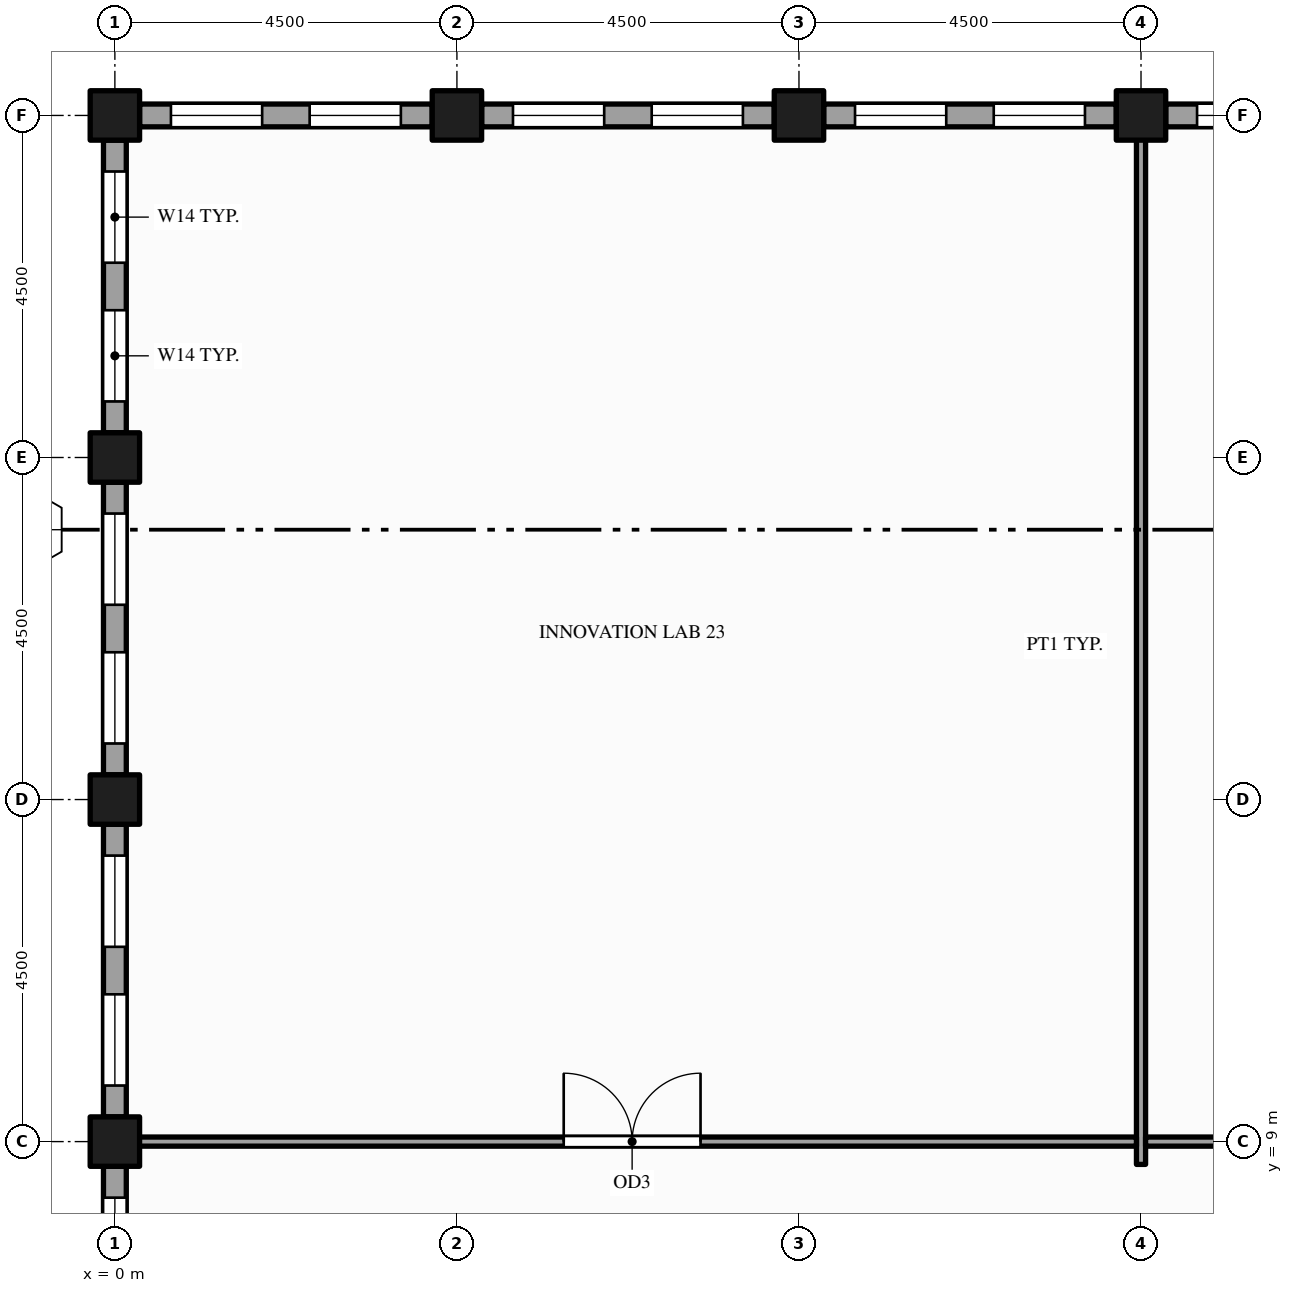
"""IFC4 building model, lengths in metres.
Left out: names, types, materials, properties, quantities, classifications, styles, units other than length and angle.
Written with IfcOpenShell. Run it as: python <this file> out.ifc"""

import sys

from ifc_helpers import new_model, si_unit, direction, frame, frame_2d, origin, origin_2d, place, context, subcontext, project, spatial, rectangle, hollow_rectangle, extrude, element, fill, save


model = new_model("IFC4")
c1 = context("Model", 3, precision=1e-05, world=origin(), true_north=direction((0.0, 1.0)))
c2 = subcontext(c1, "Body", "Model", "MODEL_VIEW")
j1 = project(units=[si_unit("LENGTHUNIT", "METRE"), si_unit("PLANEANGLEUNIT", "RADIAN")], contexts=[c1])
p1 = place(None, origin())
s1 = spatial("IfcSite", under=j1, at=p1, CompositionType="ELEMENT")
p2 = place(p1, origin())
s2 = spatial("IfcBuilding", under=s1, at=p2, CompositionType="ELEMENT")
p3 = place(p2, frame((0.0, 0.0, 269.0)))
s3 = spatial("IfcBuildingStorey", under=s2, at=p3, CompositionType="ELEMENT", Elevation=269.0)
for number, where, z_axis, x_axis in (
    (1, (0.0, 9.0, -0.15), (0.0, 0.0, 1.0), (1.0, 0.0, 0.0)),
    (2, (0.0, 13.5, -0.15), (0.0, 0.0, 1.0), (1.0, 0.0, 0.0)),
    (3, (0.0, 18.0, -0.15), (0.0, 0.0, 1.0), (1.0, 0.0, 0.0)),
    (4, (0.0, 22.5, -0.15), (0.0, 0.0, 1.0), (1.0, 0.0, 0.0)),
    (5, (4.5, 22.5, -0.15), (0.0, 0.0, 1.0), (1.0, 0.0, 0.0)),
    (6, (9.0, 22.5, -0.15), (0.0, 0.0, 1.0), (1.0, 0.0, 0.0)),
    (7, (13.5, 22.5, -0.15), (0.0, 0.0, 1.0), (1.0, 0.0, 0.0)),
):
    element("IfcColumn", number, at=place(p3, frame(where, z_axis=z_axis, x_axis=x_axis)), inside=s3, PredefinedType="COLUMN", context=c2, shape_type="SweptSolid", body=[
        extrude(hollow_rectangle(XDim=0.65, YDim=0.65, WallThickness=0.032, at=origin_2d()), origin(), (0.0, 0.0, 1.0), 4.0),
    ])
p4 = place(p3, frame((17.675, 22.5, 0.0), z_axis=(0.0, 0.0, 1.0), x_axis=(-1.0, 0.0, 0.0)))
e8 = element("IfcWall", 8, at=p4, inside=s3, PredefinedType="STANDARD", context=c2, shape_type="SweptSolid", body=[
    extrude(rectangle(XDim=3.85, YDim=0.3, at=frame_2d((1.925, 0.0))), origin(), (0.0, 0.0, 1.0), 2.87),
])
p5 = place(p4, frame((0.413, 0.0, 0.9)))
e9 = element("IfcOpeningElement", 9, at=p5, cuts=e8, PredefinedType="OPENING", context=c2, shape_type="SweptSolid", body=[
    extrude(rectangle(XDim=1.2, YDim=1.75, at=frame_2d((0.6, 0.875))), frame((0.0, 0.16, 0.0), z_axis=(0.0, -1.0, 0.0), x_axis=(1.0, 0.0, 0.0)), (0.0, 0.0, 1.0), 0.32),
])
p6 = place(p4, frame((2.238, 0.0, 0.9)))
e10 = element("IfcOpeningElement", 10, at=p6, cuts=e8, PredefinedType="OPENING", context=c2, shape_type="SweptSolid", body=[
    extrude(rectangle(XDim=1.2, YDim=1.75, at=frame_2d((0.6, 0.875))), frame((0.0, 0.16, 0.0), z_axis=(0.0, -1.0, 0.0), x_axis=(1.0, 0.0, 0.0)), (0.0, 0.0, 1.0), 0.32),
])
p7 = place(p3, frame((13.175, 22.5, 0.0), z_axis=(0.0, 0.0, 1.0), x_axis=(-1.0, 0.0, 0.0)))
e11 = element("IfcWall", 11, at=p7, inside=s3, PredefinedType="STANDARD", context=c2, shape_type="SweptSolid", body=[
    extrude(rectangle(XDim=3.85, YDim=0.3, at=frame_2d((1.925, 0.0))), origin(), (0.0, 0.0, 1.0), 2.87),
])
p8 = place(p7, frame((0.413, 0.0, 0.9)))
e12 = element("IfcOpeningElement", 12, at=p8, cuts=e11, PredefinedType="OPENING", context=c2, shape_type="SweptSolid", body=[
    extrude(rectangle(XDim=1.2, YDim=1.75, at=frame_2d((0.6, 0.875))), frame((0.0, 0.16, 0.0), z_axis=(0.0, -1.0, 0.0), x_axis=(1.0, 0.0, 0.0)), (0.0, 0.0, 1.0), 0.32),
])
p9 = place(p7, frame((2.238, 0.0, 0.9)))
e13 = element("IfcOpeningElement", 13, at=p9, cuts=e11, PredefinedType="OPENING", context=c2, shape_type="SweptSolid", body=[
    extrude(rectangle(XDim=1.2, YDim=1.75, at=frame_2d((0.6, 0.875))), frame((0.0, 0.16, 0.0), z_axis=(0.0, -1.0, 0.0), x_axis=(1.0, 0.0, 0.0)), (0.0, 0.0, 1.0), 0.32),
])
p10 = place(p3, frame((8.675, 22.5, 0.0), z_axis=(0.0, 0.0, 1.0), x_axis=(-1.0, 0.0, 0.0)))
e14 = element("IfcWall", 14, at=p10, inside=s3, PredefinedType="STANDARD", context=c2, shape_type="SweptSolid", body=[
    extrude(rectangle(XDim=3.85, YDim=0.3, at=frame_2d((1.925, 0.0))), origin(), (0.0, 0.0, 1.0), 2.87),
])
p11 = place(p10, frame((0.413, 0.0, 0.9)))
e15 = element("IfcOpeningElement", 15, at=p11, cuts=e14, PredefinedType="OPENING", context=c2, shape_type="SweptSolid", body=[
    extrude(rectangle(XDim=1.2, YDim=1.75, at=frame_2d((0.6, 0.875))), frame((0.0, 0.16, 0.0), z_axis=(0.0, -1.0, 0.0), x_axis=(1.0, 0.0, 0.0)), (0.0, 0.0, 1.0), 0.32),
])
p12 = place(p10, frame((2.238, 0.0, 0.9)))
e16 = element("IfcOpeningElement", 16, at=p12, cuts=e14, PredefinedType="OPENING", context=c2, shape_type="SweptSolid", body=[
    extrude(rectangle(XDim=1.2, YDim=1.75, at=frame_2d((0.6, 0.875))), frame((0.0, 0.16, 0.0), z_axis=(0.0, -1.0, 0.0), x_axis=(1.0, 0.0, 0.0)), (0.0, 0.0, 1.0), 0.32),
])
p13 = place(p3, frame((4.175, 22.5, 0.0), z_axis=(0.0, 0.0, 1.0), x_axis=(-1.0, 0.0, 0.0)))
e17 = element("IfcWall", 17, at=p13, inside=s3, PredefinedType="STANDARD", context=c2, shape_type="SweptSolid", body=[
    extrude(rectangle(XDim=3.85, YDim=0.3, at=frame_2d((1.925, 0.0))), origin(), (0.0, 0.0, 1.0), 2.87),
])
p14 = place(p13, frame((0.413, 0.0, 0.9)))
e18 = element("IfcOpeningElement", 18, at=p14, cuts=e17, PredefinedType="OPENING", context=c2, shape_type="SweptSolid", body=[
    extrude(rectangle(XDim=1.2, YDim=1.75, at=frame_2d((0.6, 0.875))), frame((0.0, 0.16, 0.0), z_axis=(0.0, -1.0, 0.0), x_axis=(1.0, 0.0, 0.0)), (0.0, 0.0, 1.0), 0.32),
])
p15 = place(p13, frame((2.238, 0.0, 0.9)))
e19 = element("IfcOpeningElement", 19, at=p15, cuts=e17, PredefinedType="OPENING", context=c2, shape_type="SweptSolid", body=[
    extrude(rectangle(XDim=1.2, YDim=1.75, at=frame_2d((0.6, 0.875))), frame((0.0, 0.16, 0.0), z_axis=(0.0, -1.0, 0.0), x_axis=(1.0, 0.0, 0.0)), (0.0, 0.0, 1.0), 0.32),
])
p16 = place(p3, frame((0.0, 22.175, 0.0), z_axis=(0.0, 0.0, 1.0), x_axis=(0.0, -1.0, 0.0)))
e20 = element("IfcWall", 20, at=p16, inside=s3, PredefinedType="STANDARD", context=c2, shape_type="SweptSolid", body=[
    extrude(rectangle(XDim=3.85, YDim=0.3, at=frame_2d((1.925, 0.0))), origin(), (0.0, 0.0, 1.0), 3.162),
])
p17 = place(p16, frame((0.413, 0.0, 0.9)))
e21 = element("IfcOpeningElement", 21, at=p17, cuts=e20, PredefinedType="OPENING", context=c2, shape_type="SweptSolid", body=[
    extrude(rectangle(XDim=1.2, YDim=2.0, at=frame_2d((0.6, 1.0))), frame((0.0, 0.16, 0.0), z_axis=(0.0, -1.0, 0.0), x_axis=(1.0, 0.0, 0.0)), (0.0, 0.0, 1.0), 0.32),
])
p18 = place(p16, frame((2.238, 0.0, 0.9)))
e22 = element("IfcOpeningElement", 22, at=p18, cuts=e20, PredefinedType="OPENING", context=c2, shape_type="SweptSolid", body=[
    extrude(rectangle(XDim=1.2, YDim=2.0, at=frame_2d((0.6, 1.0))), frame((0.0, 0.16, 0.0), z_axis=(0.0, -1.0, 0.0), x_axis=(1.0, 0.0, 0.0)), (0.0, 0.0, 1.0), 0.32),
])
p19 = place(p3, frame((0.0, 17.675, 0.0), z_axis=(0.0, 0.0, 1.0), x_axis=(0.0, -1.0, 0.0)))
e23 = element("IfcWall", 23, at=p19, inside=s3, PredefinedType="STANDARD", context=c2, shape_type="SweptSolid", body=[
    extrude(rectangle(XDim=3.85, YDim=0.3, at=frame_2d((1.925, 0.0))), origin(), (0.0, 0.0, 1.0), 3.162),
])
p20 = place(p19, frame((0.413, 0.0, 0.9)))
e24 = element("IfcOpeningElement", 24, at=p20, cuts=e23, PredefinedType="OPENING", context=c2, shape_type="SweptSolid", body=[
    extrude(rectangle(XDim=1.2, YDim=2.0, at=frame_2d((0.6, 1.0))), frame((0.0, 0.16, 0.0), z_axis=(0.0, -1.0, 0.0), x_axis=(1.0, 0.0, 0.0)), (0.0, 0.0, 1.0), 0.32),
])
p21 = place(p19, frame((2.238, 0.0, 0.9)))
e25 = element("IfcOpeningElement", 25, at=p21, cuts=e23, PredefinedType="OPENING", context=c2, shape_type="SweptSolid", body=[
    extrude(rectangle(XDim=1.2, YDim=2.0, at=frame_2d((0.6, 1.0))), frame((0.0, 0.16, 0.0), z_axis=(0.0, -1.0, 0.0), x_axis=(1.0, 0.0, 0.0)), (0.0, 0.0, 1.0), 0.32),
])
p22 = place(p3, frame((0.0, 13.175, 0.0), z_axis=(0.0, 0.0, 1.0), x_axis=(0.0, -1.0, 0.0)))
e26 = element("IfcWall", 26, at=p22, inside=s3, PredefinedType="STANDARD", context=c2, shape_type="SweptSolid", body=[
    extrude(rectangle(XDim=3.85, YDim=0.3, at=frame_2d((1.925, 0.0))), origin(), (0.0, 0.0, 1.0), 3.162),
])
p23 = place(p22, frame((0.413, 0.0, 0.9)))
e27 = element("IfcOpeningElement", 27, at=p23, cuts=e26, PredefinedType="OPENING", context=c2, shape_type="SweptSolid", body=[
    extrude(rectangle(XDim=1.2, YDim=2.0, at=frame_2d((0.6, 1.0))), frame((0.0, 0.16, 0.0), z_axis=(0.0, -1.0, 0.0), x_axis=(1.0, 0.0, 0.0)), (0.0, 0.0, 1.0), 0.32),
])
p24 = place(p22, frame((2.238, 0.0, 0.9)))
e28 = element("IfcOpeningElement", 28, at=p24, cuts=e26, PredefinedType="OPENING", context=c2, shape_type="SweptSolid", body=[
    extrude(rectangle(XDim=1.2, YDim=2.0, at=frame_2d((0.6, 1.0))), frame((0.0, 0.16, 0.0), z_axis=(0.0, -1.0, 0.0), x_axis=(1.0, 0.0, 0.0)), (0.0, 0.0, 1.0), 0.32),
])
p25 = place(p3, frame((0.0, 8.675, 0.0), z_axis=(0.0, 0.0, 1.0), x_axis=(0.0, -1.0, 0.0)))
e29 = element("IfcWall", 29, at=p25, inside=s3, PredefinedType="STANDARD", context=c2, shape_type="SweptSolid", body=[
    extrude(rectangle(XDim=3.85, YDim=0.3, at=frame_2d((1.925, 0.0))), origin(), (0.0, 0.0, 1.0), 3.162),
])
p26 = place(p25, frame((0.413, 0.0, 0.9)))
e30 = element("IfcOpeningElement", 30, at=p26, cuts=e29, PredefinedType="OPENING", context=c2, shape_type="SweptSolid", body=[
    extrude(rectangle(XDim=1.2, YDim=2.0, at=frame_2d((0.6, 1.0))), frame((0.0, 0.16, 0.0), z_axis=(0.0, -1.0, 0.0), x_axis=(1.0, 0.0, 0.0)), (0.0, 0.0, 1.0), 0.32),
])
p27 = place(p25, frame((2.238, 0.0, 0.9)))
e31 = element("IfcOpeningElement", 31, at=p27, cuts=e29, PredefinedType="OPENING", context=c2, shape_type="SweptSolid", body=[
    extrude(rectangle(XDim=1.2, YDim=2.0, at=frame_2d((0.6, 1.0))), frame((0.0, 0.16, 0.0), z_axis=(0.0, -1.0, 0.0), x_axis=(1.0, 0.0, 0.0)), (0.0, 0.0, 1.0), 0.32),
])
p28 = place(p3, frame((13.5, 8.7, 0.0), z_axis=(0.0, 0.0, 1.0), x_axis=(0.0, 1.0, 0.0)))
e32 = element("IfcWall", 32, at=p28, inside=s3, PredefinedType="PARTITIONING", context=c2, shape_type="SweptSolid", body=[
    extrude(rectangle(XDim=13.65, YDim=0.12, at=frame_2d((6.825, 0.0))), origin(), (0.0, 0.0, 1.0), 2.87),
])
p29 = place(p3, frame((0.15, 9.0, 0.0), z_axis=(0.0, 0.0, 1.0), x_axis=(1.0, 0.0, 0.0)))
e33 = element("IfcWall", 33, at=p29, inside=s3, PredefinedType="PARTITIONING", context=c2, shape_type="SweptSolid", body=[
    extrude(rectangle(XDim=13.29, YDim=0.12, at=frame_2d((6.645, 0.0))), origin(), (0.0, 0.0, 1.0), 2.87),
])
p30 = place(p29, frame((5.755, 0.0, 0.0)))
e34 = element("IfcOpeningElement", 34, at=p30, cuts=e33, PredefinedType="OPENING", context=c2, shape_type="SweptSolid", body=[
    extrude(rectangle(XDim=1.8, YDim=2.1, at=frame_2d((0.9, 1.05))), frame((0.0, 0.07, 0.0), z_axis=(0.0, -1.0, 0.0), x_axis=(1.0, 0.0, 0.0)), (0.0, 0.0, 1.0), 0.14),
])
p31 = place(p3, frame((13.56, 9.0, 0.0), z_axis=(0.0, 0.0, 1.0), x_axis=(1.0, 0.0, 0.0)))
e35 = element("IfcWall", 35, at=p31, inside=s3, PredefinedType="PARTITIONING", context=c2, shape_type="SweptSolid", body=[
    extrude(rectangle(XDim=6.63, YDim=0.12, at=frame_2d((3.315, 0.0))), origin(), (0.0, 0.0, 1.0), 2.87),
])
p32 = place(p31, frame((2.815, 0.0, 0.0)))
e36 = element("IfcOpeningElement", 36, at=p32, cuts=e35, PredefinedType="OPENING", context=c2, shape_type="SweptSolid", body=[
    extrude(rectangle(XDim=1.0, YDim=2.1, at=frame_2d((0.5, 1.05))), frame((0.0, 0.07, 0.0), z_axis=(0.0, -1.0, 0.0), x_axis=(1.0, 0.0, 0.0)), (0.0, 0.0, 1.0), 0.14),
])
p33 = place(p6, origin())
e37 = element("IfcWindow", 37, at=p33, inside=s3, PartitioningType="SINGLE_PANEL", PredefinedType="WINDOW", context=c2, shape_type="SweptSolid", body=[
    extrude(rectangle(XDim=1.2, YDim=1.75, at=frame_2d((0.6, 0.875))), frame((0.0, 0.03, 0.0), z_axis=(0.0, -1.0, 0.0), x_axis=(1.0, 0.0, 0.0)), (0.0, 0.0, 1.0), 0.06),
])
fill(e10, e37)
p34 = place(p8, origin())
e38 = element("IfcWindow", 38, at=p34, inside=s3, PartitioningType="SINGLE_PANEL", PredefinedType="WINDOW", context=c2, shape_type="SweptSolid", body=[
    extrude(rectangle(XDim=1.2, YDim=1.75, at=frame_2d((0.6, 0.875))), frame((0.0, 0.03, 0.0), z_axis=(0.0, -1.0, 0.0), x_axis=(1.0, 0.0, 0.0)), (0.0, 0.0, 1.0), 0.06),
])
fill(e12, e38)
p35 = place(p9, origin())
e39 = element("IfcWindow", 39, at=p35, inside=s3, PartitioningType="SINGLE_PANEL", PredefinedType="WINDOW", context=c2, shape_type="SweptSolid", body=[
    extrude(rectangle(XDim=1.2, YDim=1.75, at=frame_2d((0.6, 0.875))), frame((0.0, 0.03, 0.0), z_axis=(0.0, -1.0, 0.0), x_axis=(1.0, 0.0, 0.0)), (0.0, 0.0, 1.0), 0.06),
])
fill(e13, e39)
p36 = place(p11, origin())
e40 = element("IfcWindow", 40, at=p36, inside=s3, PartitioningType="SINGLE_PANEL", PredefinedType="WINDOW", context=c2, shape_type="SweptSolid", body=[
    extrude(rectangle(XDim=1.2, YDim=1.75, at=frame_2d((0.6, 0.875))), frame((0.0, 0.03, 0.0), z_axis=(0.0, -1.0, 0.0), x_axis=(1.0, 0.0, 0.0)), (0.0, 0.0, 1.0), 0.06),
])
fill(e15, e40)
p37 = place(p12, origin())
e41 = element("IfcWindow", 41, at=p37, inside=s3, PartitioningType="SINGLE_PANEL", PredefinedType="WINDOW", context=c2, shape_type="SweptSolid", body=[
    extrude(rectangle(XDim=1.2, YDim=1.75, at=frame_2d((0.6, 0.875))), frame((0.0, 0.03, 0.0), z_axis=(0.0, -1.0, 0.0), x_axis=(1.0, 0.0, 0.0)), (0.0, 0.0, 1.0), 0.06),
])
fill(e16, e41)
p38 = place(p14, origin())
e42 = element("IfcWindow", 42, at=p38, inside=s3, PartitioningType="SINGLE_PANEL", PredefinedType="WINDOW", context=c2, shape_type="SweptSolid", body=[
    extrude(rectangle(XDim=1.2, YDim=1.75, at=frame_2d((0.6, 0.875))), frame((0.0, 0.03, 0.0), z_axis=(0.0, -1.0, 0.0), x_axis=(1.0, 0.0, 0.0)), (0.0, 0.0, 1.0), 0.06),
])
fill(e18, e42)
p39 = place(p15, origin())
e43 = element("IfcWindow", 43, at=p39, inside=s3, PartitioningType="SINGLE_PANEL", PredefinedType="WINDOW", context=c2, shape_type="SweptSolid", body=[
    extrude(rectangle(XDim=1.2, YDim=1.75, at=frame_2d((0.6, 0.875))), frame((0.0, 0.03, 0.0), z_axis=(0.0, -1.0, 0.0), x_axis=(1.0, 0.0, 0.0)), (0.0, 0.0, 1.0), 0.06),
])
fill(e19, e43)
p40 = place(p17, origin())
e44 = element("IfcWindow", 44, at=p40, inside=s3, PartitioningType="SINGLE_PANEL", PredefinedType="WINDOW", context=c2, shape_type="SweptSolid", body=[
    extrude(rectangle(XDim=1.2, YDim=2.0, at=frame_2d((0.6, 1.0))), frame((0.0, 0.03, 0.0), z_axis=(0.0, -1.0, 0.0), x_axis=(1.0, 0.0, 0.0)), (0.0, 0.0, 1.0), 0.06),
])
fill(e21, e44)
p41 = place(p18, origin())
e45 = element("IfcWindow", 45, at=p41, inside=s3, PartitioningType="SINGLE_PANEL", PredefinedType="WINDOW", context=c2, shape_type="SweptSolid", body=[
    extrude(rectangle(XDim=1.2, YDim=2.0, at=frame_2d((0.6, 1.0))), frame((0.0, 0.03, 0.0), z_axis=(0.0, -1.0, 0.0), x_axis=(1.0, 0.0, 0.0)), (0.0, 0.0, 1.0), 0.06),
])
fill(e22, e45)
p42 = place(p20, origin())
e46 = element("IfcWindow", 46, at=p42, inside=s3, PartitioningType="SINGLE_PANEL", PredefinedType="WINDOW", context=c2, shape_type="SweptSolid", body=[
    extrude(rectangle(XDim=1.2, YDim=2.0, at=frame_2d((0.6, 1.0))), frame((0.0, 0.03, 0.0), z_axis=(0.0, -1.0, 0.0), x_axis=(1.0, 0.0, 0.0)), (0.0, 0.0, 1.0), 0.06),
])
fill(e24, e46)
p43 = place(p21, origin())
e47 = element("IfcWindow", 47, at=p43, inside=s3, PartitioningType="SINGLE_PANEL", PredefinedType="WINDOW", context=c2, shape_type="SweptSolid", body=[
    extrude(rectangle(XDim=1.2, YDim=2.0, at=frame_2d((0.6, 1.0))), frame((0.0, 0.03, 0.0), z_axis=(0.0, -1.0, 0.0), x_axis=(1.0, 0.0, 0.0)), (0.0, 0.0, 1.0), 0.06),
])
fill(e25, e47)
p44 = place(p23, origin())
e48 = element("IfcWindow", 48, at=p44, inside=s3, PartitioningType="SINGLE_PANEL", PredefinedType="WINDOW", context=c2, shape_type="SweptSolid", body=[
    extrude(rectangle(XDim=1.2, YDim=2.0, at=frame_2d((0.6, 1.0))), frame((0.0, 0.03, 0.0), z_axis=(0.0, -1.0, 0.0), x_axis=(1.0, 0.0, 0.0)), (0.0, 0.0, 1.0), 0.06),
])
fill(e27, e48)
p45 = place(p24, origin())
e49 = element("IfcWindow", 49, at=p45, inside=s3, PartitioningType="SINGLE_PANEL", PredefinedType="WINDOW", context=c2, shape_type="SweptSolid", body=[
    extrude(rectangle(XDim=1.2, YDim=2.0, at=frame_2d((0.6, 1.0))), frame((0.0, 0.03, 0.0), z_axis=(0.0, -1.0, 0.0), x_axis=(1.0, 0.0, 0.0)), (0.0, 0.0, 1.0), 0.06),
])
fill(e28, e49)
p46 = place(p26, origin())
e50 = element("IfcWindow", 50, at=p46, inside=s3, PartitioningType="SINGLE_PANEL", PredefinedType="WINDOW", context=c2, shape_type="SweptSolid", body=[
    extrude(rectangle(XDim=1.2, YDim=2.0, at=frame_2d((0.6, 1.0))), frame((0.0, 0.03, 0.0), z_axis=(0.0, -1.0, 0.0), x_axis=(1.0, 0.0, 0.0)), (0.0, 0.0, 1.0), 0.06),
])
fill(e30, e50)
p47 = place(p30, origin())
e51 = element("IfcDoor", 51, at=p47, inside=s3, OperationType="DOUBLE_DOOR_SINGLE_SWING", PredefinedType="DOOR", context=c2, shape_type="SweptSolid", body=[
    extrude(rectangle(XDim=1.8, YDim=2.1, at=frame_2d((0.9, 1.05))), frame((0.0, 0.025, 0.0), z_axis=(0.0, -1.0, 0.0), x_axis=(1.0, 0.0, 0.0)), (0.0, 0.0, 1.0), 0.05),
])
fill(e34, e51)
save(model, sys.argv[1])
